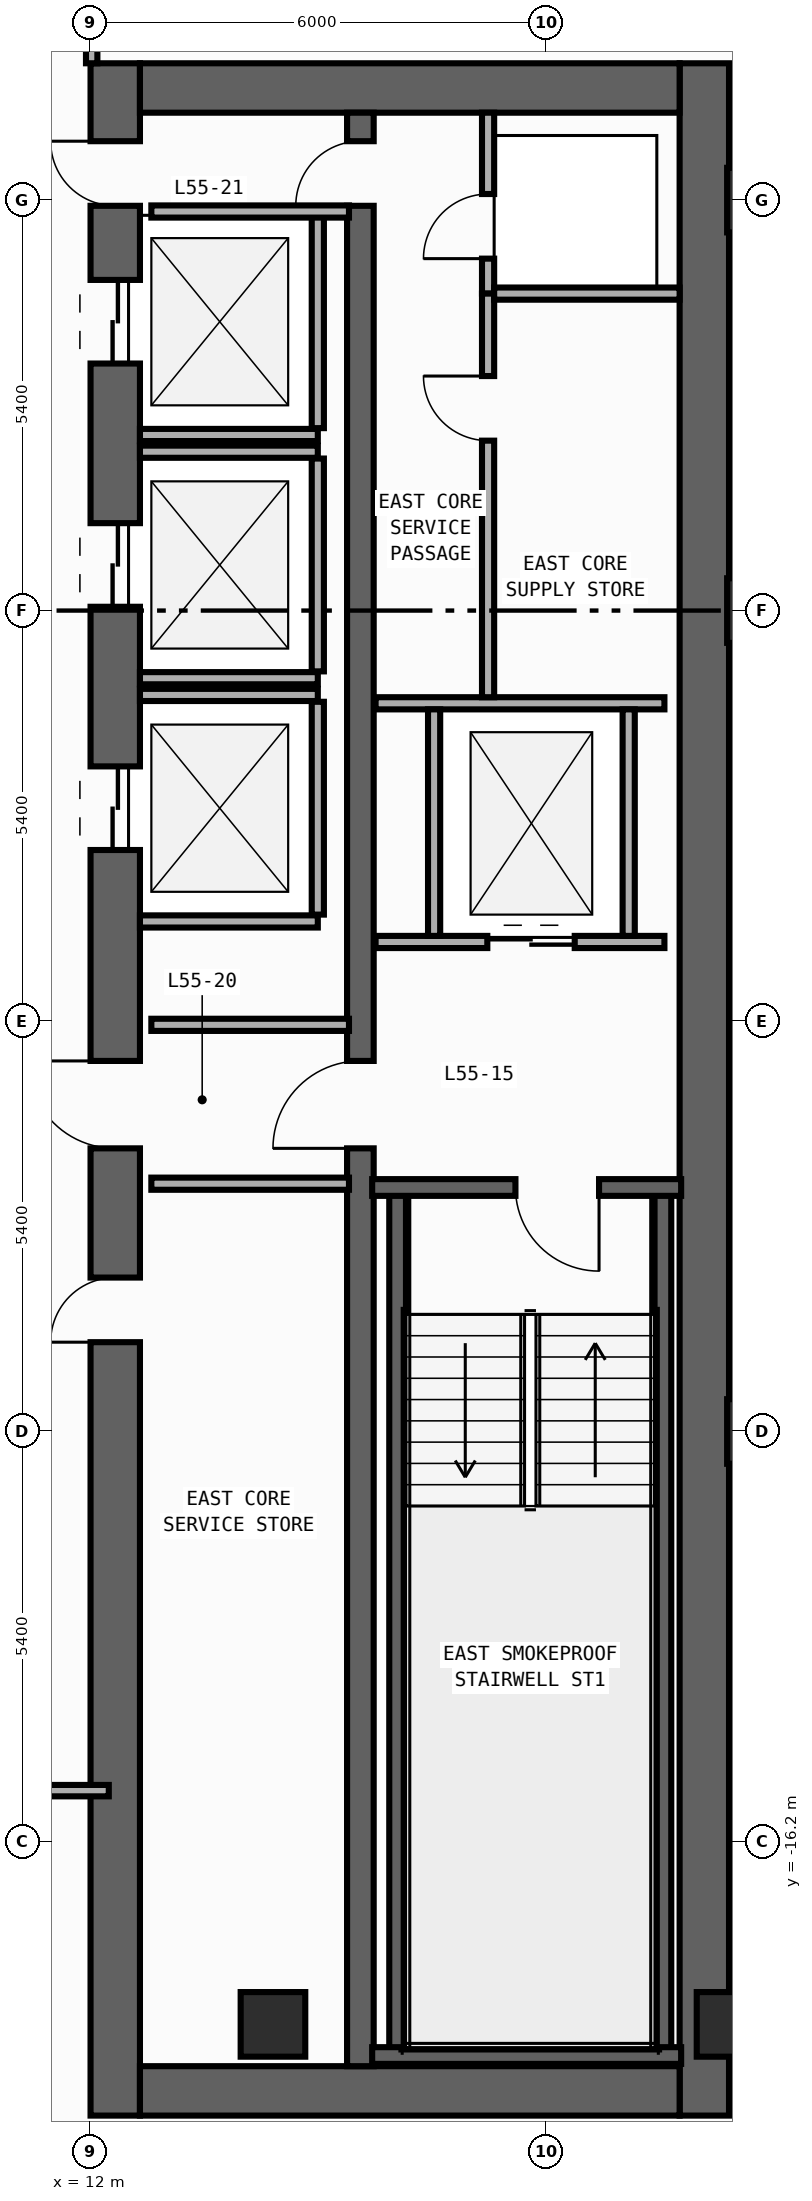
"""IFC4 building model, lengths in metres.
Left out: names, types, materials, properties, quantities, classifications, styles, units other than length and angle.
Written with IfcOpenShell. Run it as: python <this file> out.ifc"""

import sys

from ifc_helpers import new_model, si_unit, direction, frame, frame_2d, origin, origin_2d, place, context, subcontext, project, spatial, rectangle, extrude, element, fill, save


model = new_model("IFC4")
c1 = context("Model", 3, precision=1e-05, world=origin(), true_north=direction((0.0, 1.0)))
c2 = subcontext(c1, "Body", "Model", "MODEL_VIEW")
j1 = project(units=[si_unit("LENGTHUNIT", "METRE"), si_unit("PLANEANGLEUNIT", "RADIAN")], contexts=[c1])
p1 = place(None, origin())
s1 = spatial("IfcSite", under=j1, at=p1, CompositionType="ELEMENT")
p2 = place(p1, origin())
s2 = spatial("IfcBuilding", under=s1, at=p2, CompositionType="ELEMENT")
p3 = place(p2, frame((0.0, 0.0, 236.8)))
s3 = spatial("IfcBuildingStorey", under=s2, at=p3, CompositionType="ELEMENT", Elevation=236.8)
p4 = place(p3, frame((12.325, -19.8, 0.0), z_axis=(0.0, 0.0, 1.0), x_axis=(0.0, 1.0, 0.0)))
e1 = element("IfcWall", 1, at=p4, inside=s3, PredefinedType="SHEAR", context=c2, shape_type="SweptSolid", body=[
    extrude(rectangle(XDim=27.0, YDim=0.65, at=frame_2d((13.5, 0.0))), origin(), (0.0, 0.0, 1.0), 3.34),
])
p5 = place(p4, frame((23.05, 0.0, 0.0)))
e2 = element("IfcOpeningElement", 2, at=p5, cuts=e1, PredefinedType="OPENING", context=c2, shape_type="SweptSolid", body=[
    extrude(rectangle(XDim=1.1, YDim=2.2, at=frame_2d((0.55, 1.1))), frame((0.0, 0.335, 0.0), z_axis=(0.0, -1.0, 0.0), x_axis=(1.0, 0.0, 0.0)), (0.0, 0.0, 1.0), 0.67),
])
p6 = place(p4, frame((19.85, 0.0, 0.0)))
e3 = element("IfcOpeningElement", 3, at=p6, cuts=e1, PredefinedType="OPENING", context=c2, shape_type="SweptSolid", body=[
    extrude(rectangle(XDim=1.1, YDim=2.2, at=frame_2d((0.55, 1.1))), frame((0.0, 0.335, 0.0), z_axis=(0.0, -1.0, 0.0), x_axis=(1.0, 0.0, 0.0)), (0.0, 0.0, 1.0), 0.67),
])
p7 = place(p4, frame((16.65, 0.0, 0.0)))
e4 = element("IfcOpeningElement", 4, at=p7, cuts=e1, PredefinedType="OPENING", context=c2, shape_type="SweptSolid", body=[
    extrude(rectangle(XDim=1.1, YDim=2.2, at=frame_2d((0.55, 1.1))), frame((0.0, 0.335, 0.0), z_axis=(0.0, -1.0, 0.0), x_axis=(1.0, 0.0, 0.0)), (0.0, 0.0, 1.0), 0.67),
])
p8 = place(p4, frame((10.175, 0.0, 0.0)))
e5 = element("IfcOpeningElement", 5, at=p8, cuts=e1, PredefinedType="OPENING", context=c2, shape_type="SweptSolid", body=[
    extrude(rectangle(XDim=0.85, YDim=2.1, at=frame_2d((0.425, 1.05))), frame((0.0, 0.335, 0.0), z_axis=(0.0, -1.0, 0.0), x_axis=(1.0, 0.0, 0.0)), (0.0, 0.0, 1.0), 0.67),
])
p9 = place(p4, frame((12.725, 0.0, 0.0)))
e6 = element("IfcOpeningElement", 6, at=p9, cuts=e1, PredefinedType="OPENING", context=c2, shape_type="SweptSolid", body=[
    extrude(rectangle(XDim=1.15, YDim=2.2, at=frame_2d((0.575, 1.1))), frame((0.0, 0.335, 0.0), z_axis=(0.0, -1.0, 0.0), x_axis=(1.0, 0.0, 0.0)), (0.0, 0.0, 1.0), 0.67),
])
p10 = place(p4, frame((25.125, 0.0, 0.0)))
e7 = element("IfcOpeningElement", 7, at=p10, cuts=e1, PredefinedType="OPENING", context=c2, shape_type="SweptSolid", body=[
    extrude(rectangle(XDim=0.85, YDim=2.1, at=frame_2d((0.425, 1.05))), frame((0.0, 0.335, 0.0), z_axis=(0.0, -1.0, 0.0), x_axis=(1.0, 0.0, 0.0)), (0.0, 0.0, 1.0), 0.67),
])
p11 = place(p3, frame((20.075, -19.8, 0.0), z_axis=(0.0, 0.0, 1.0), x_axis=(0.0, 1.0, 0.0)))
e8 = element("IfcWall", 8, at=p11, inside=s3, PredefinedType="SHEAR", context=c2, shape_type="SweptSolid", body=[
    extrude(rectangle(XDim=27.0, YDim=0.65, at=frame_2d((13.5, 0.0))), origin(), (0.0, 0.0, 1.0), 3.34),
])
for number, where, z_axis, x_axis in (
    (9, (12.65, -19.475, 0.0), (0.0, 0.0, 1.0), (1.0, 0.0, 0.0)),
    (10, (12.65, 6.875, 0.0), (0.0, 0.0, 1.0), (1.0, 0.0, 0.0)),
):
    element("IfcWall", number, at=place(p3, frame(where, z_axis=z_axis, x_axis=x_axis)), inside=s3, PredefinedType="SHEAR", context=c2, shape_type="SweptSolid", body=[
        extrude(rectangle(XDim=7.1, YDim=0.65, at=frame_2d((3.55, 0.0))), origin(), (0.0, 0.0, 1.0), 3.34),
    ])
p12 = place(p3, frame((15.55, -19.15, 0.0), z_axis=(0.0, 0.0, 1.0), x_axis=(0.0, 1.0, 0.0)))
e11 = element("IfcWall", 11, at=p12, inside=s3, PredefinedType="SHEAR", context=c2, shape_type="SweptSolid", body=[
    extrude(rectangle(XDim=25.7, YDim=0.35, at=frame_2d((12.85, 0.0))), origin(), (0.0, 0.0, 1.0), 3.34),
])
p13 = place(p12, frame((12.075, 0.0, 0.0)))
e12 = element("IfcOpeningElement", 12, at=p13, cuts=e11, PredefinedType="OPENING", context=c2, shape_type="SweptSolid", body=[
    extrude(rectangle(XDim=1.15, YDim=2.2, at=frame_2d((0.575, 1.1))), frame((0.0, 0.185, 0.0), z_axis=(0.0, -1.0, 0.0), x_axis=(1.0, 0.0, 0.0)), (0.0, 0.0, 1.0), 0.37),
])
p14 = place(p12, frame((24.475, 0.0, 0.0)))
e13 = element("IfcOpeningElement", 13, at=p14, cuts=e11, PredefinedType="OPENING", context=c2, shape_type="SweptSolid", body=[
    extrude(rectangle(XDim=0.85, YDim=2.1, at=frame_2d((0.425, 1.05))), frame((0.0, 0.185, 0.0), z_axis=(0.0, -1.0, 0.0), x_axis=(1.0, 0.0, 0.0)), (0.0, 0.0, 1.0), 0.37),
])
for number, where, z_axis, x_axis in (
    (14, (16.04, -19.01, 0.0), (0.0, 0.0, 1.0), (0.0, 1.0, 0.0)),
    (15, (19.53, -19.01, 0.0), (0.0, 0.0, 1.0), (0.0, 1.0, 0.0)),
):
    element("IfcWall", number, at=place(p3, frame(where, z_axis=z_axis, x_axis=x_axis)), inside=s3, PredefinedType="SHEAR", context=c2, shape_type="SweptSolid", body=[
        extrude(rectangle(XDim=11.42, YDim=0.22, at=frame_2d((5.71, 0.0))), origin(), (0.0, 0.0, 1.0), 3.34),
    ])
p15 = place(p3, frame((15.705, -19.01, 0.0), z_axis=(0.0, 0.0, 1.0), x_axis=(1.0, 0.0, 0.0)))
e16 = element("IfcWall", 16, at=p15, inside=s3, PredefinedType="SHEAR", context=c2, shape_type="SweptSolid", body=[
    extrude(rectangle(XDim=4.065, YDim=0.22, at=frame_2d((2.032, 0.0))), origin(), (0.0, 0.0, 1.0), 3.34),
])
p16 = place(p3, frame((19.77, -7.59, 0.0), z_axis=(0.0, 0.0, 1.0), x_axis=(-1.0, 0.0, 0.0)))
e17 = element("IfcWall", 17, at=p16, inside=s3, PredefinedType="SHEAR", context=c2, shape_type="SweptSolid", body=[
    extrude(rectangle(XDim=4.065, YDim=0.22, at=frame_2d((2.032, 0.0))), origin(), (0.0, 0.0, 1.0), 3.34),
])
p17 = place(p16, frame((1.08, 0.0, 0.0)))
e18 = element("IfcOpeningElement", 18, at=p17, cuts=e17, PredefinedType="OPENING", context=c2, shape_type="SweptSolid", body=[
    extrude(rectangle(XDim=1.1, YDim=2.2, at=frame_2d((0.55, 1.1))), frame((0.0, 0.12, 0.0), z_axis=(0.0, -1.0, 0.0), x_axis=(1.0, 0.0, 0.0)), (0.0, 0.0, 1.0), 0.24),
])
for number, where, z_axis, x_axis in (
    (19, (20.4, -18.6, 0.0), (0.0, 0.0, 1.0), (1.0, 0.0, 0.0)),
    (20, (14.4, -18.6, 0.0), (0.0, 0.0, 1.0), (1.0, 0.0, 0.0)),
    (21, (20.8, -10.8, 0.0), (0.0, 0.0, 1.0), (1.0, 0.0, 0.0)),
    (22, (20.8, 0.0, 0.0), (0.0, 0.0, 1.0), (1.0, 0.0, 0.0)),
    (23, (20.8, 5.4, 0.0), (0.0, 0.0, 1.0), (1.0, 0.0, 0.0)),
):
    element("IfcColumn", number, at=place(p3, frame(where, z_axis=z_axis, x_axis=x_axis)), inside=s3, PredefinedType="COLUMN", context=c2, shape_type="SweptSolid", body=[
        extrude(rectangle(XDim=0.85, YDim=0.85, at=origin_2d()), origin(), (0.0, 0.0, 1.0), 3.6),
    ])
p18 = place(p3, frame((12.65, 2.31, 0.0), z_axis=(0.0, 0.0, 1.0), x_axis=(1.0, 0.0, 0.0)))
e24 = element("IfcWall", 24, at=p18, inside=s3, PredefinedType="STANDARD", context=c2, shape_type="SweptSolid", body=[
    extrude(rectangle(XDim=2.34, YDim=0.16, at=frame_2d((1.17, 0.0))), origin(), (0.0, 0.0, 1.0), 3.34),
])
p19 = place(p3, frame((14.99, 2.4, 0.0), z_axis=(0.0, 0.0, 1.0), x_axis=(0.0, 1.0, 0.0)))
e25 = element("IfcWall", 25, at=p19, inside=s3, PredefinedType="STANDARD", context=c2, shape_type="SweptSolid", body=[
    extrude(rectangle(XDim=2.8, YDim=0.16, at=frame_2d((1.4, 0.0))), origin(), (0.0, 0.0, 1.0), 3.34),
])
for number, where, z_axis, x_axis in (
    (26, (12.65, -0.89, 0.0), (0.0, 0.0, 1.0), (1.0, 0.0, 0.0)),
    (27, (12.65, 2.09, 0.0), (0.0, 0.0, 1.0), (1.0, 0.0, 0.0)),
):
    element("IfcWall", number, at=place(p3, frame(where, z_axis=z_axis, x_axis=x_axis)), inside=s3, PredefinedType="STANDARD", context=c2, shape_type="SweptSolid", body=[
        extrude(rectangle(XDim=2.34, YDim=0.16, at=frame_2d((1.17, 0.0))), origin(), (0.0, 0.0, 1.0), 3.34),
    ])
p20 = place(p3, frame((14.99, -0.8, 0.0), z_axis=(0.0, 0.0, 1.0), x_axis=(0.0, 1.0, 0.0)))
e28 = element("IfcWall", 28, at=p20, inside=s3, PredefinedType="STANDARD", context=c2, shape_type="SweptSolid", body=[
    extrude(rectangle(XDim=2.8, YDim=0.16, at=frame_2d((1.4, 0.0))), origin(), (0.0, 0.0, 1.0), 3.34),
])
for number, where, z_axis, x_axis in (
    (29, (12.65, -4.09, 0.0), (0.0, 0.0, 1.0), (1.0, 0.0, 0.0)),
    (30, (12.65, -1.11, 0.0), (0.0, 0.0, 1.0), (1.0, 0.0, 0.0)),
):
    element("IfcWall", number, at=place(p3, frame(where, z_axis=z_axis, x_axis=x_axis)), inside=s3, PredefinedType="STANDARD", context=c2, shape_type="SweptSolid", body=[
        extrude(rectangle(XDim=2.34, YDim=0.16, at=frame_2d((1.17, 0.0))), origin(), (0.0, 0.0, 1.0), 3.34),
    ])
p21 = place(p3, frame((14.99, -4.0, 0.0), z_axis=(0.0, 0.0, 1.0), x_axis=(0.0, 1.0, 0.0)))
e31 = element("IfcWall", 31, at=p21, inside=s3, PredefinedType="STANDARD", context=c2, shape_type="SweptSolid", body=[
    extrude(rectangle(XDim=2.8, YDim=0.16, at=frame_2d((1.4, 0.0))), origin(), (0.0, 0.0, 1.0), 3.34),
])
p22 = place(p3, frame((15.75, -4.36, 0.0), z_axis=(0.0, 0.0, 1.0), x_axis=(1.0, 0.0, 0.0)))
e32 = element("IfcWall", 32, at=p22, inside=s3, PredefinedType="STANDARD", context=c2, shape_type="SweptSolid", body=[
    extrude(rectangle(XDim=3.8, YDim=0.16, at=frame_2d((1.9, 0.0))), origin(), (0.0, 0.0, 1.0), 3.34),
])
p23 = place(p22, frame((1.47, 0.0, 0.0)))
e33 = element("IfcOpeningElement", 33, at=p23, cuts=e32, PredefinedType="OPENING", context=c2, shape_type="SweptSolid", body=[
    extrude(rectangle(XDim=1.15, YDim=2.2, at=frame_2d((0.575, 1.1))), frame((0.0, 0.09, 0.0), z_axis=(0.0, -1.0, 0.0), x_axis=(1.0, 0.0, 0.0)), (0.0, 0.0, 1.0), 0.18),
])
p24 = place(p3, frame((15.75, -1.22, 0.0), z_axis=(0.0, 0.0, 1.0), x_axis=(1.0, 0.0, 0.0)))
e34 = element("IfcWall", 34, at=p24, inside=s3, PredefinedType="STANDARD", context=c2, shape_type="SweptSolid", body=[
    extrude(rectangle(XDim=3.8, YDim=0.16, at=frame_2d((1.9, 0.0))), origin(), (0.0, 0.0, 1.0), 3.34),
])
for number, where, z_axis, x_axis in (
    (35, (16.52, -4.28, 0.0), (0.0, 0.0, 1.0), (0.0, 1.0, 0.0)),
    (36, (19.08, -4.28, 0.0), (0.0, 0.0, 1.0), (0.0, 1.0, 0.0)),
):
    element("IfcWall", number, at=place(p3, frame(where, z_axis=z_axis, x_axis=x_axis)), inside=s3, PredefinedType="STANDARD", context=c2, shape_type="SweptSolid", body=[
        extrude(rectangle(XDim=2.98, YDim=0.16, at=frame_2d((1.49, 0.0))), origin(), (0.0, 0.0, 1.0), 3.34),
    ])
for number, where, z_axis, x_axis in (
    (37, (12.8, -5.45, 0.0), (0.0, 0.0, 1.0), (1.0, 0.0, 0.0)),
    (38, (12.8, -7.54, 0.0), (0.0, 0.0, 1.0), (1.0, 0.0, 0.0)),
    (39, (12.8, 5.25, 0.0), (0.0, 0.0, 1.0), (1.0, 0.0, 0.0)),
):
    element("IfcWall", number, at=place(p3, frame(where, z_axis=z_axis, x_axis=x_axis)), inside=s3, PredefinedType="STANDARD", context=c2, shape_type="SweptSolid", body=[
        extrude(rectangle(XDim=2.6, YDim=0.16, at=frame_2d((1.3, 0.0))), origin(), (0.0, 0.0, 1.0), 3.34),
    ])
p25 = place(p3, frame((17.23, 4.17, 0.0), z_axis=(0.0, 0.0, 1.0), x_axis=(0.0, 1.0, 0.0)))
e40 = element("IfcWall", 40, at=p25, inside=s3, PredefinedType="PARTITIONING", context=c2, shape_type="SweptSolid", body=[
    extrude(rectangle(XDim=2.38, YDim=0.16, at=frame_2d((1.19, 0.0))), origin(), (0.0, 0.0, 1.0), 3.34),
])
p26 = place(p25, frame((0.46, 0.0, 0.0)))
e41 = element("IfcOpeningElement", 41, at=p26, cuts=e40, PredefinedType="OPENING", context=c2, shape_type="SweptSolid", body=[
    extrude(rectangle(XDim=0.85, YDim=2.1, at=frame_2d((0.425, 1.05))), frame((0.0, 0.09, 0.0), z_axis=(0.0, -1.0, 0.0), x_axis=(1.0, 0.0, 0.0)), (0.0, 0.0, 1.0), 0.18),
])
p27 = place(p3, frame((17.23, -1.14, 0.0), z_axis=(0.0, 0.0, 1.0), x_axis=(0.0, 1.0, 0.0)))
e42 = element("IfcWall", 42, at=p27, inside=s3, PredefinedType="PARTITIONING", context=c2, shape_type="SweptSolid", body=[
    extrude(rectangle(XDim=5.31, YDim=0.16, at=frame_2d((2.655, 0.0))), origin(), (0.0, 0.0, 1.0), 3.34),
])
p28 = place(p27, frame((3.375, 0.0, 0.0)))
e43 = element("IfcOpeningElement", 43, at=p28, cuts=e42, PredefinedType="OPENING", context=c2, shape_type="SweptSolid", body=[
    extrude(rectangle(XDim=0.85, YDim=2.1, at=frame_2d((0.425, 1.05))), frame((0.0, 0.09, 0.0), z_axis=(0.0, -1.0, 0.0), x_axis=(1.0, 0.0, 0.0)), (0.0, 0.0, 1.0), 0.18),
])
p29 = place(p3, frame((17.31, 4.17, 0.0), z_axis=(0.0, 0.0, 1.0), x_axis=(1.0, 0.0, 0.0)))
e44 = element("IfcWall", 44, at=p29, inside=s3, PredefinedType="PARTITIONING", context=c2, shape_type="SweptSolid", body=[
    extrude(rectangle(XDim=2.44, YDim=0.16, at=frame_2d((1.22, 0.0))), origin(), (0.0, 0.0, 1.0), 3.34),
])
p30 = place(p3, frame((12.015, 7.2, 0.0), z_axis=(0.0, 0.0, 1.0), x_axis=(0.0, 1.0, 0.0)))
e45 = element("IfcWall", 45, at=p30, inside=s3, PredefinedType="PARTITIONING", context=c2, shape_type="SweptSolid", body=[
    extrude(rectangle(XDim=6.52, YDim=0.15, at=frame_2d((3.26, 0.0))), origin(), (0.0, 0.0, 1.0), 3.34),
])
p31 = place(p30, frame((0.67, 0.0, 0.0)))
e46 = element("IfcOpeningElement", 46, at=p31, cuts=e45, PredefinedType="OPENING", context=c2, shape_type="SweptSolid", body=[
    extrude(rectangle(XDim=0.9, YDim=2.15, at=frame_2d((0.45, 1.075))), frame((0.0, 0.085, 0.0), z_axis=(0.0, -1.0, 0.0), x_axis=(1.0, 0.0, 0.0)), (0.0, 0.0, 1.0), 0.17),
])
p32 = place(p3, frame((7.805, -15.525, 0.0), z_axis=(0.0, 0.0, 1.0), x_axis=(1.0, 0.0, 0.0)))
e47 = element("IfcWall", 47, at=p32, inside=s3, PredefinedType="PARTITIONING", context=c2, shape_type="SweptSolid", body=[
    extrude(rectangle(XDim=4.435, YDim=0.15, at=frame_2d((2.218, 0.0))), origin(), (0.0, 0.0, 1.0), 3.34),
])
p33 = place(p17, origin())
e48 = element("IfcDoor", 48, at=p33, inside=s3, OperationType="SINGLE_SWING_LEFT", PredefinedType="DOOR", context=c2, shape_type="SweptSolid", body=[
    extrude(rectangle(XDim=1.1, YDim=2.2, at=frame_2d((0.55, 1.1))), frame((0.0, 0.025, 0.0), z_axis=(0.0, -1.0, 0.0), x_axis=(1.0, 0.0, 0.0)), (0.0, 0.0, 1.0), 0.05),
])
fill(e18, e48)
p34 = place(p5, origin())
e49 = element("IfcDoor", 49, at=p34, inside=s3, OperationType="DOUBLE_DOOR_SLIDING", PredefinedType="DOOR", context=c2, shape_type="SweptSolid", body=[
    extrude(rectangle(XDim=1.1, YDim=2.2, at=frame_2d((0.55, 1.1))), frame((0.0, 0.025, 0.0), z_axis=(0.0, -1.0, 0.0), x_axis=(1.0, 0.0, 0.0)), (0.0, 0.0, 1.0), 0.05),
])
fill(e2, e49)
p35 = place(p6, origin())
e50 = element("IfcDoor", 50, at=p35, inside=s3, OperationType="DOUBLE_DOOR_SLIDING", PredefinedType="DOOR", context=c2, shape_type="SweptSolid", body=[
    extrude(rectangle(XDim=1.1, YDim=2.2, at=frame_2d((0.55, 1.1))), frame((0.0, 0.025, 0.0), z_axis=(0.0, -1.0, 0.0), x_axis=(1.0, 0.0, 0.0)), (0.0, 0.0, 1.0), 0.05),
])
fill(e3, e50)
p36 = place(p7, origin())
e51 = element("IfcDoor", 51, at=p36, inside=s3, OperationType="DOUBLE_DOOR_SLIDING", PredefinedType="DOOR", context=c2, shape_type="SweptSolid", body=[
    extrude(rectangle(XDim=1.1, YDim=2.2, at=frame_2d((0.55, 1.1))), frame((0.0, 0.025, 0.0), z_axis=(0.0, -1.0, 0.0), x_axis=(1.0, 0.0, 0.0)), (0.0, 0.0, 1.0), 0.05),
])
fill(e4, e51)
p37 = place(p8, origin())
e52 = element("IfcDoor", 52, at=p37, inside=s3, OperationType="SINGLE_SWING_LEFT", PredefinedType="DOOR", context=c2, shape_type="SweptSolid", body=[
    extrude(rectangle(XDim=0.85, YDim=2.1, at=frame_2d((0.425, 1.05))), frame((0.0, 0.025, 0.0), z_axis=(0.0, -1.0, 0.0), x_axis=(1.0, 0.0, 0.0)), (0.0, 0.0, 1.0), 0.05),
])
fill(e5, e52)
p38 = place(p9, origin())
e53 = element("IfcDoor", 53, at=p38, inside=s3, OperationType="SINGLE_SWING_RIGHT", PredefinedType="DOOR", context=c2, shape_type="SweptSolid", body=[
    extrude(rectangle(XDim=1.15, YDim=2.2, at=frame_2d((0.575, 1.1))), frame((0.0, 0.025, 0.0), z_axis=(0.0, -1.0, 0.0), x_axis=(1.0, 0.0, 0.0)), (0.0, 0.0, 1.0), 0.05),
])
fill(e6, e53)
p39 = place(p13, origin())
e54 = element("IfcDoor", 54, at=p39, inside=s3, OperationType="SINGLE_SWING_LEFT", PredefinedType="DOOR", context=c2, shape_type="SweptSolid", body=[
    extrude(rectangle(XDim=1.15, YDim=2.2, at=frame_2d((0.575, 1.1))), frame((0.0, 0.025, 0.0), z_axis=(0.0, -1.0, 0.0), x_axis=(1.0, 0.0, 0.0)), (0.0, 0.0, 1.0), 0.05),
])
fill(e12, e54)
p40 = place(p10, origin())
e55 = element("IfcDoor", 55, at=p40, inside=s3, OperationType="SINGLE_SWING_RIGHT", PredefinedType="DOOR", context=c2, shape_type="SweptSolid", body=[
    extrude(rectangle(XDim=0.85, YDim=2.1, at=frame_2d((0.425, 1.05))), frame((0.0, 0.025, 0.0), z_axis=(0.0, -1.0, 0.0), x_axis=(1.0, 0.0, 0.0)), (0.0, 0.0, 1.0), 0.05),
])
fill(e7, e55)
p41 = place(p14, origin())
e56 = element("IfcDoor", 56, at=p41, inside=s3, OperationType="SINGLE_SWING_LEFT", PredefinedType="DOOR", context=c2, shape_type="SweptSolid", body=[
    extrude(rectangle(XDim=0.85, YDim=2.1, at=frame_2d((0.425, 1.05))), frame((0.0, 0.025, 0.0), z_axis=(0.0, -1.0, 0.0), x_axis=(1.0, 0.0, 0.0)), (0.0, 0.0, 1.0), 0.05),
])
fill(e13, e56)
p42 = place(p23, origin())
e57 = element("IfcDoor", 57, at=p42, inside=s3, OperationType="DOUBLE_DOOR_SLIDING", PredefinedType="DOOR", context=c2, shape_type="SweptSolid", body=[
    extrude(rectangle(XDim=1.15, YDim=2.2, at=frame_2d((0.575, 1.1))), frame((0.0, 0.025, 0.0), z_axis=(0.0, -1.0, 0.0), x_axis=(1.0, 0.0, 0.0)), (0.0, 0.0, 1.0), 0.05),
])
fill(e33, e57)
p43 = place(p26, origin())
e58 = element("IfcDoor", 58, at=p43, inside=s3, OperationType="SINGLE_SWING_LEFT", PredefinedType="DOOR", context=c2, shape_type="SweptSolid", body=[
    extrude(rectangle(XDim=0.85, YDim=2.1, at=frame_2d((0.425, 1.05))), frame((0.0, 0.025, 0.0), z_axis=(0.0, -1.0, 0.0), x_axis=(1.0, 0.0, 0.0)), (0.0, 0.0, 1.0), 0.05),
])
fill(e41, e58)
p44 = place(p28, origin())
e59 = element("IfcDoor", 59, at=p44, inside=s3, OperationType="SINGLE_SWING_RIGHT", PredefinedType="DOOR", context=c2, shape_type="SweptSolid", body=[
    extrude(rectangle(XDim=0.85, YDim=2.1, at=frame_2d((0.425, 1.05))), frame((0.0, 0.025, 0.0), z_axis=(0.0, -1.0, 0.0), x_axis=(1.0, 0.0, 0.0)), (0.0, 0.0, 1.0), 0.05),
])
fill(e43, e59)
save(model, sys.argv[1])
